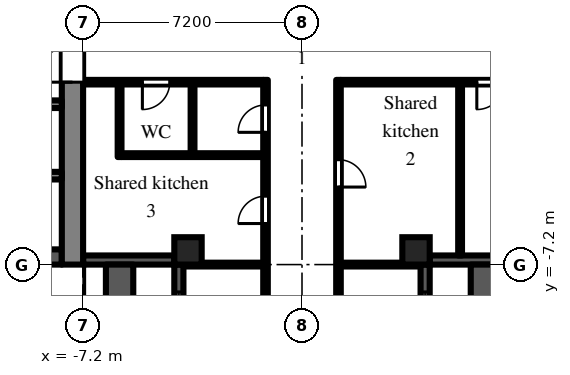
"""IFC4 building model, lengths in metres.
Left out: names, types, materials, properties, quantities, classifications, styles, units other than length and angle.
Written with IfcOpenShell. Run it as: python <this file> out.ifc"""

import sys

from ifc_helpers import new_model, si_unit, direction, frame, frame_2d, origin, origin_2d, place, context, subcontext, project, spatial, rectangle, extrude, element, fill, save


model = new_model("IFC4")
c1 = context("Model", 3, precision=1e-05, world=origin(), true_north=direction((0.0, 1.0)))
c2 = subcontext(c1, "Body", "Model", "MODEL_VIEW")
j1 = project(units=[si_unit("LENGTHUNIT", "METRE"), si_unit("PLANEANGLEUNIT", "RADIAN")], contexts=[c1])
p1 = place(None, origin())
s1 = spatial("IfcSite", under=j1, at=p1, CompositionType="ELEMENT")
p2 = place(p1, origin())
s2 = spatial("IfcBuilding", under=s1, at=p2, CompositionType="ELEMENT")
p3 = place(p2, frame((0.0, 0.0, 29.7)))
s3 = spatial("IfcBuildingStorey", under=s2, at=p3, CompositionType="ELEMENT", Elevation=29.7)
for number, where, z_axis, x_axis in (
    (1, (-3.75, -6.75, 0.0), (0.0, 0.0, 1.0), (1.0, 0.0, 0.0)),
    (2, (3.75, -6.75, 0.0), (0.0, 0.0, 1.0), (1.0, 0.0, 0.0)),
):
    element("IfcColumn", number, at=place(p3, frame(where, z_axis=z_axis, x_axis=x_axis)), inside=s3, PredefinedType="COLUMN", context=c2, shape_type="SweptSolid", body=[
        extrude(rectangle(XDim=0.9, YDim=0.9, at=origin_2d()), origin(), (0.0, 0.0, 1.0), 3.0),
    ])
p4 = place(p3, frame((-7.2, -7.05, 0.0), z_axis=(0.0, 0.0, 1.0), x_axis=(1.0, 0.0, 0.0)))
e3 = element("IfcWall", 3, at=p4, inside=s3, PredefinedType="SOLIDWALL", context=c2, shape_type="SweptSolid", body=[
    extrude(rectangle(XDim=3.0, YDim=0.3, at=frame_2d((1.5, 0.0))), origin(), (0.0, 0.0, 1.0), 2.1),
])
p5 = place(p3, frame((-4.05, -7.2, 0.0), z_axis=(0.0, 0.0, 1.0), x_axis=(0.0, -1.0, 0.0)))
e4 = element("IfcWall", 4, at=p5, inside=s3, PredefinedType="SOLIDWALL", context=c2, shape_type="SweptSolid", body=[
    extrude(rectangle(XDim=7.2, YDim=0.3, at=frame_2d((3.6, 0.0))), origin(), (0.0, 0.0, 1.0), 2.1),
])
p6 = place(p5, frame((3.0, 0.0, 0.0)))
e5 = element("IfcOpeningElement", 5, at=p6, cuts=e4, PredefinedType="OPENING", context=c2, shape_type="SweptSolid", body=[
    extrude(rectangle(XDim=1.2, YDim=2.05, at=frame_2d((0.6, 1.025))), frame((0.0, 0.16, 0.0), z_axis=(0.0, -1.0, 0.0), x_axis=(1.0, 0.0, 0.0)), (0.0, 0.0, 1.0), 0.32),
])
p7 = place(p5, frame((0.9, 0.0, 0.2)))
e6 = element("IfcOpeningElement", 6, at=p7, cuts=e4, PredefinedType="OPENING", context=c2, shape_type="SweptSolid", body=[
    extrude(rectangle(XDim=1.8, YDim=1.85, at=frame_2d((0.9, 0.925))), frame((0.0, 0.16, 0.0), z_axis=(0.0, -1.0, 0.0), x_axis=(1.0, 0.0, 0.0)), (0.0, 0.0, 1.0), 0.32),
])
p8 = place(p5, frame((4.5, 0.0, 0.2)))
e7 = element("IfcOpeningElement", 7, at=p8, cuts=e4, PredefinedType="OPENING", context=c2, shape_type="SweptSolid", body=[
    extrude(rectangle(XDim=1.8, YDim=1.85, at=frame_2d((0.9, 0.925))), frame((0.0, 0.16, 0.0), z_axis=(0.0, -1.0, 0.0), x_axis=(1.0, 0.0, 0.0)), (0.0, 0.0, 1.0), 0.32),
])
p9 = place(p3, frame((4.05, -14.4, 0.0), z_axis=(0.0, 0.0, 1.0), x_axis=(0.0, 1.0, 0.0)))
e8 = element("IfcWall", 8, at=p9, inside=s3, PredefinedType="SOLIDWALL", context=c2, shape_type="SweptSolid", body=[
    extrude(rectangle(XDim=7.2, YDim=0.3, at=frame_2d((3.6, 0.0))), origin(), (0.0, 0.0, 1.0), 2.1),
])
p10 = place(p9, frame((3.0, 0.0, 0.0)))
e9 = element("IfcOpeningElement", 9, at=p10, cuts=e8, PredefinedType="OPENING", context=c2, shape_type="SweptSolid", body=[
    extrude(rectangle(XDim=1.2, YDim=2.05, at=frame_2d((0.6, 1.025))), frame((0.0, 0.16, 0.0), z_axis=(0.0, -1.0, 0.0), x_axis=(1.0, 0.0, 0.0)), (0.0, 0.0, 1.0), 0.32),
])
p11 = place(p9, frame((0.9, 0.0, 0.2)))
e10 = element("IfcOpeningElement", 10, at=p11, cuts=e8, PredefinedType="OPENING", context=c2, shape_type="SweptSolid", body=[
    extrude(rectangle(XDim=1.8, YDim=1.85, at=frame_2d((0.9, 0.925))), frame((0.0, 0.16, 0.0), z_axis=(0.0, -1.0, 0.0), x_axis=(1.0, 0.0, 0.0)), (0.0, 0.0, 1.0), 0.32),
])
p12 = place(p9, frame((4.5, 0.0, 0.2)))
e11 = element("IfcOpeningElement", 11, at=p12, cuts=e8, PredefinedType="OPENING", context=c2, shape_type="SweptSolid", body=[
    extrude(rectangle(XDim=1.8, YDim=1.85, at=frame_2d((0.9, 0.925))), frame((0.0, 0.16, 0.0), z_axis=(0.0, -1.0, 0.0), x_axis=(1.0, 0.0, 0.0)), (0.0, 0.0, 1.0), 0.32),
])
p13 = place(p3, frame((4.2, -7.05, 0.0), z_axis=(0.0, 0.0, 1.0), x_axis=(1.0, 0.0, 0.0)))
e12 = element("IfcWall", 12, at=p13, inside=s3, PredefinedType="SOLIDWALL", context=c2, shape_type="SweptSolid", body=[
    extrude(rectangle(XDim=3.0, YDim=0.3, at=frame_2d((1.5, 0.0))), origin(), (0.0, 0.0, 1.0), 2.1),
])
for number, where, z_axis, x_axis in (
    (13, (6.0, -14.4, 0.0), (0.0, 0.0, 1.0), (0.0, 1.0, 0.0)),
    (14, (-6.0, -14.4, 0.0), (0.0, 0.0, 1.0), (0.0, 1.0, 0.0)),
):
    element("IfcWall", number, at=place(p3, frame(where, z_axis=z_axis, x_axis=x_axis)), inside=s3, PredefinedType="PARAPET", context=c2, shape_type="SweptSolid", body=[
        extrude(rectangle(XDim=7.2, YDim=0.9, at=frame_2d((3.6, 0.0))), origin(), (0.0, 0.0, 1.0), 0.8),
    ])
p14 = place(p3, frame((-7.55, -7.2, 0.0), z_axis=(0.0, 0.0, 1.0), x_axis=(0.0, 1.0, 0.0)))
e15 = element("IfcWall", 15, at=p14, inside=s3, PredefinedType="SHEAR", context=c2, shape_type="SweptSolid", body=[
    extrude(rectangle(XDim=14.4, YDim=0.7, at=frame_2d((7.2, 0.0))), origin(), (0.0, 0.0, 1.0), 2.575),
])
p15 = place(p14, frame((6.0, 0.0, 0.0)))
e16 = element("IfcOpeningElement", 16, at=p15, cuts=e15, PredefinedType="OPENING", context=c2, shape_type="SweptSolid", body=[
    extrude(rectangle(XDim=2.4, YDim=2.2, at=frame_2d((1.2, 1.1))), frame((0.0, 0.36, 0.0), z_axis=(0.0, -1.0, 0.0), x_axis=(1.0, 0.0, 0.0)), (0.0, 0.0, 1.0), 0.72),
])
p16 = place(p3, frame((-7.9, -6.95, 0.0), z_axis=(0.0, 0.0, 1.0), x_axis=(-1.0, 0.0, 0.0)))
e17 = element("IfcWall", 17, at=p16, inside=s3, PredefinedType="SHEAR", context=c2, shape_type="SweptSolid", body=[
    extrude(rectangle(XDim=12.95, YDim=0.5, at=frame_2d((6.475, 0.0))), origin(), (0.0, 0.0, 1.0), 2.575),
])
p17 = place(p3, frame((-7.9, -1.925, 0.0), z_axis=(0.0, 0.0, 1.0), x_axis=(-1.0, 0.0, 0.0)))
e18 = element("IfcWall", 18, at=p17, inside=s3, PredefinedType="SHEAR", context=c2, shape_type="SweptSolid", body=[
    extrude(rectangle(XDim=12.95, YDim=0.25, at=frame_2d((6.475, 0.0))), origin(), (0.0, 0.0, 1.0), 2.575),
])
p18 = place(p17, frame((4.825, 0.0, 0.0)))
e19 = element("IfcOpeningElement", 19, at=p18, cuts=e18, PredefinedType="OPENING", context=c2, shape_type="SweptSolid", body=[
    extrude(rectangle(XDim=1.1, YDim=2.1, at=frame_2d((0.55, 1.05))), frame((0.0, 0.135, 0.0), z_axis=(0.0, -1.0, 0.0), x_axis=(1.0, 0.0, 0.0)), (0.0, 0.0, 1.0), 0.27),
])
p19 = place(p17, frame((7.025, 0.0, 0.0)))
e20 = element("IfcOpeningElement", 20, at=p19, cuts=e18, PredefinedType="OPENING", context=c2, shape_type="SweptSolid", body=[
    extrude(rectangle(XDim=1.1, YDim=2.1, at=frame_2d((0.55, 1.05))), frame((0.0, 0.135, 0.0), z_axis=(0.0, -1.0, 0.0), x_axis=(1.0, 0.0, 0.0)), (0.0, 0.0, 1.0), 0.27),
])
p20 = place(p17, frame((9.225, 0.0, 0.0)))
e21 = element("IfcOpeningElement", 21, at=p20, cuts=e18, PredefinedType="OPENING", context=c2, shape_type="SweptSolid", body=[
    extrude(rectangle(XDim=1.1, YDim=2.1, at=frame_2d((0.55, 1.05))), frame((0.0, 0.135, 0.0), z_axis=(0.0, -1.0, 0.0), x_axis=(1.0, 0.0, 0.0)), (0.0, 0.0, 1.0), 0.27),
])
p21 = place(p17, frame((0.525, 0.0, 0.0)))
e22 = element("IfcOpeningElement", 22, at=p21, cuts=e18, PredefinedType="OPENING", context=c2, shape_type="SweptSolid", body=[
    extrude(rectangle(XDim=0.9, YDim=2.1, at=frame_2d((0.45, 1.05))), frame((0.0, 0.135, 0.0), z_axis=(0.0, -1.0, 0.0), x_axis=(1.0, 0.0, 0.0)), (0.0, 0.0, 1.0), 0.27),
])
p22 = place(p17, frame((2.625, 0.0, 0.0)))
e23 = element("IfcOpeningElement", 23, at=p22, cuts=e18, PredefinedType="OPENING", context=c2, shape_type="SweptSolid", body=[
    extrude(rectangle(XDim=1.1, YDim=2.1, at=frame_2d((0.55, 1.05))), frame((0.0, 0.135, 0.0), z_axis=(0.0, -1.0, 0.0), x_axis=(1.0, 0.0, 0.0)), (0.0, 0.0, 1.0), 0.27),
])
p23 = place(p3, frame((-7.9, -4.275, 0.0), z_axis=(0.0, 0.0, 1.0), x_axis=(-1.0, 0.0, 0.0)))
e24 = element("IfcWall", 24, at=p23, inside=s3, PredefinedType="SHEAR", context=c2, shape_type="SweptSolid", body=[
    extrude(rectangle(XDim=1.95, YDim=0.25, at=frame_2d((0.975, 0.0))), origin(), (0.0, 0.0, 1.0), 2.575),
])
p24 = place(p3, frame((-7.2, -1.2, 0.0), z_axis=(0.0, 0.0, 1.0), x_axis=(1.0, 0.0, 0.0)))
e25 = element("IfcWall", 25, at=p24, inside=s3, PredefinedType="PARTITIONING", context=c2, shape_type="SweptSolid", body=[
    extrude(rectangle(XDim=5.925, YDim=0.15, at=frame_2d((2.962, 0.0))), origin(), (0.0, 0.0, 1.0), 2.575),
])
p25 = place(p24, frame((1.95, 0.0, 0.0)))
e26 = element("IfcOpeningElement", 26, at=p25, cuts=e25, PredefinedType="OPENING", context=c2, shape_type="SweptSolid", body=[
    extrude(rectangle(XDim=0.9, YDim=2.1, at=frame_2d((0.45, 1.05))), frame((0.0, 0.085, 0.0), z_axis=(0.0, -1.0, 0.0), x_axis=(1.0, 0.0, 0.0)), (0.0, 0.0, 1.0), 0.17),
])
p26 = place(p3, frame((-6.0, -3.663, 0.0), z_axis=(0.0, 0.0, 1.0), x_axis=(0.0, 1.0, 0.0)))
e27 = element("IfcWall", 27, at=p26, inside=s3, PredefinedType="PARTITIONING", context=c2, shape_type="SweptSolid", body=[
    extrude(rectangle(XDim=2.388, YDim=0.125, at=frame_2d((1.194, 0.0))), origin(), (0.0, 0.0, 1.0), 2.575),
])
p27 = place(p3, frame((-5.938, -3.6, 0.0), z_axis=(0.0, 0.0, 1.0), x_axis=(1.0, 0.0, 0.0)))
e28 = element("IfcWall", 28, at=p27, inside=s3, PredefinedType="PARTITIONING", context=c2, shape_type="SweptSolid", body=[
    extrude(rectangle(XDim=4.663, YDim=0.125, at=frame_2d((2.331, 0.0))), origin(), (0.0, 0.0, 1.0), 2.575),
])
p28 = place(p3, frame((-3.9, -7.2, 0.0), z_axis=(0.0, 0.0, 1.0), x_axis=(1.0, 0.0, 0.0)))
e29 = element("IfcWall", 29, at=p28, inside=s3, PredefinedType="PARTITIONING", context=c2, shape_type="SweptSolid", body=[
    extrude(rectangle(XDim=2.625, YDim=0.125, at=frame_2d((1.312, 0.0))), origin(), (0.0, 0.0, 1.0), 2.575),
])
p29 = place(p3, frame((-3.6, -3.538, 0.0), z_axis=(0.0, 0.0, 1.0), x_axis=(0.0, 1.0, 0.0)))
e30 = element("IfcWall", 30, at=p29, inside=s3, PredefinedType="PARTITIONING", context=c2, shape_type="SweptSolid", body=[
    extrude(rectangle(XDim=2.263, YDim=0.125, at=frame_2d((1.131, 0.0))), origin(), (0.0, 0.0, 1.0), 2.575),
])
p30 = place(p3, frame((-1.2, -36.5, 0.0), z_axis=(0.0, 0.0, 1.0), x_axis=(0.0, 1.0, 0.0)))
e31 = element("IfcWall", 31, at=p30, inside=s3, PredefinedType="PARTITIONING", context=c2, shape_type="SweptSolid", body=[
    extrude(rectangle(XDim=35.375, YDim=0.15, at=frame_2d((17.688, 0.0))), origin(), (0.0, 0.0, 1.0), 2.575),
])
p31 = place(p30, frame((33.65, 0.0, 0.0)))
e32 = element("IfcOpeningElement", 32, at=p31, cuts=e31, PredefinedType="OPENING", context=c2, shape_type="SweptSolid", body=[
    extrude(rectangle(XDim=0.9, YDim=2.1, at=frame_2d((0.45, 1.05))), frame((0.0, 0.085, 0.0), z_axis=(0.0, -1.0, 0.0), x_axis=(1.0, 0.0, 0.0)), (0.0, 0.0, 1.0), 0.17),
])
p32 = place(p30, frame((30.65, 0.0, 0.0)))
e33 = element("IfcOpeningElement", 33, at=p32, cuts=e31, PredefinedType="OPENING", context=c2, shape_type="SweptSolid", body=[
    extrude(rectangle(XDim=0.9, YDim=2.1, at=frame_2d((0.45, 1.05))), frame((0.0, 0.085, 0.0), z_axis=(0.0, -1.0, 0.0), x_axis=(1.0, 0.0, 0.0)), (0.0, 0.0, 1.0), 0.17),
])
p33 = place(p30, frame((27.05, 0.0, 0.0)))
e34 = element("IfcOpeningElement", 34, at=p33, cuts=e31, PredefinedType="OPENING", context=c2, shape_type="SweptSolid", body=[
    extrude(rectangle(XDim=0.9, YDim=2.1, at=frame_2d((0.45, 1.05))), frame((0.0, 0.085, 0.0), z_axis=(0.0, -1.0, 0.0), x_axis=(1.0, 0.0, 0.0)), (0.0, 0.0, 1.0), 0.17),
])
p34 = place(p30, frame((20.9, 0.0, 0.0)))
e35 = element("IfcOpeningElement", 35, at=p34, cuts=e31, PredefinedType="OPENING", context=c2, shape_type="SweptSolid", body=[
    extrude(rectangle(XDim=1.0, YDim=2.1, at=frame_2d((0.5, 1.05))), frame((0.0, 0.085, 0.0), z_axis=(0.0, -1.0, 0.0), x_axis=(1.0, 0.0, 0.0)), (0.0, 0.0, 1.0), 0.17),
])
p35 = place(p30, frame((1.55, 0.0, 0.0)))
e36 = element("IfcOpeningElement", 36, at=p35, cuts=e31, PredefinedType="OPENING", context=c2, shape_type="SweptSolid", body=[
    extrude(rectangle(XDim=1.0, YDim=2.1, at=frame_2d((0.5, 1.05))), frame((0.0, 0.085, 0.0), z_axis=(0.0, -1.0, 0.0), x_axis=(1.0, 0.0, 0.0)), (0.0, 0.0, 1.0), 0.17),
])
p36 = place(p3, frame((1.2, -36.5, 0.0), z_axis=(0.0, 0.0, 1.0), x_axis=(0.0, 1.0, 0.0)))
e37 = element("IfcWall", 37, at=p36, inside=s3, PredefinedType="PARTITIONING", context=c2, shape_type="SweptSolid", body=[
    extrude(rectangle(XDim=35.375, YDim=0.15, at=frame_2d((17.688, 0.0))), origin(), (0.0, 0.0, 1.0), 2.575),
])
p37 = place(p36, frame((31.85, 0.0, 0.0)))
e38 = element("IfcOpeningElement", 38, at=p37, cuts=e37, PredefinedType="OPENING", context=c2, shape_type="SweptSolid", body=[
    extrude(rectangle(XDim=0.9, YDim=2.1, at=frame_2d((0.45, 1.05))), frame((0.0, 0.085, 0.0), z_axis=(0.0, -1.0, 0.0), x_axis=(1.0, 0.0, 0.0)), (0.0, 0.0, 1.0), 0.17),
])
p38 = place(p36, frame((23.45, 0.0, 0.0)))
e39 = element("IfcOpeningElement", 39, at=p38, cuts=e37, PredefinedType="OPENING", context=c2, shape_type="SweptSolid", body=[
    extrude(rectangle(XDim=0.9, YDim=2.1, at=frame_2d((0.45, 1.05))), frame((0.0, 0.085, 0.0), z_axis=(0.0, -1.0, 0.0), x_axis=(1.0, 0.0, 0.0)), (0.0, 0.0, 1.0), 0.17),
])
p39 = place(p36, frame((20.5, 0.0, 0.0)))
e40 = element("IfcOpeningElement", 40, at=p39, cuts=e37, PredefinedType="OPENING", context=c2, shape_type="SweptSolid", body=[
    extrude(rectangle(XDim=1.0, YDim=2.1, at=frame_2d((0.5, 1.05))), frame((0.0, 0.085, 0.0), z_axis=(0.0, -1.0, 0.0), x_axis=(1.0, 0.0, 0.0)), (0.0, 0.0, 1.0), 0.17),
])
p40 = place(p36, frame((1.55, 0.0, 0.0)))
e41 = element("IfcOpeningElement", 41, at=p40, cuts=e37, PredefinedType="OPENING", context=c2, shape_type="SweptSolid", body=[
    extrude(rectangle(XDim=1.0, YDim=2.1, at=frame_2d((0.5, 1.05))), frame((0.0, 0.085, 0.0), z_axis=(0.0, -1.0, 0.0), x_axis=(1.0, 0.0, 0.0)), (0.0, 0.0, 1.0), 0.17),
])
p41 = place(p3, frame((1.275, -7.2, 0.0), z_axis=(0.0, 0.0, 1.0), x_axis=(1.0, 0.0, 0.0)))
e42 = element("IfcWall", 42, at=p41, inside=s3, PredefinedType="PARTITIONING", context=c2, shape_type="SweptSolid", body=[
    extrude(rectangle(XDim=2.625, YDim=0.125, at=frame_2d((1.312, 0.0))), origin(), (0.0, 0.0, 1.0), 2.575),
])
p42 = place(p3, frame((1.275, -1.2, 0.0), z_axis=(0.0, 0.0, 1.0), x_axis=(1.0, 0.0, 0.0)))
e43 = element("IfcWall", 43, at=p42, inside=s3, PredefinedType="PARTITIONING", context=c2, shape_type="SweptSolid", body=[
    extrude(rectangle(XDim=5.925, YDim=0.15, at=frame_2d((2.962, 0.0))), origin(), (0.0, 0.0, 1.0), 2.575),
])
p43 = place(p42, frame((4.475, 0.0, 0.0)))
e44 = element("IfcOpeningElement", 44, at=p43, cuts=e43, PredefinedType="OPENING", context=c2, shape_type="SweptSolid", body=[
    extrude(rectangle(XDim=0.9, YDim=2.1, at=frame_2d((0.45, 1.05))), frame((0.0, 0.085, 0.0), z_axis=(0.0, -1.0, 0.0), x_axis=(1.0, 0.0, 0.0)), (0.0, 0.0, 1.0), 0.17),
])
p44 = place(p3, frame((5.2, -6.9, 0.0), z_axis=(0.0, 0.0, 1.0), x_axis=(0.0, 1.0, 0.0)))
e45 = element("IfcWall", 45, at=p44, inside=s3, PredefinedType="PARTITIONING", context=c2, shape_type="SweptSolid", body=[
    extrude(rectangle(XDim=5.625, YDim=0.125, at=frame_2d((2.812, 0.0))), origin(), (0.0, 0.0, 1.0), 2.575),
])
p45 = place(p7, origin())
e46 = element("IfcWindow", 46, at=p45, inside=s3, PartitioningType="SINGLE_PANEL", PredefinedType="WINDOW", context=c2, shape_type="SweptSolid", body=[
    extrude(rectangle(XDim=1.8, YDim=1.85, at=frame_2d((0.9, 0.925))), frame((0.0, 0.03, 0.0), z_axis=(0.0, -1.0, 0.0), x_axis=(1.0, 0.0, 0.0)), (0.0, 0.0, 1.0), 0.06),
])
fill(e6, e46)
p46 = place(p12, origin())
e47 = element("IfcWindow", 47, at=p46, inside=s3, PartitioningType="SINGLE_PANEL", PredefinedType="WINDOW", context=c2, shape_type="SweptSolid", body=[
    extrude(rectangle(XDim=1.8, YDim=1.85, at=frame_2d((0.9, 0.925))), frame((0.0, 0.03, 0.0), z_axis=(0.0, -1.0, 0.0), x_axis=(1.0, 0.0, 0.0)), (0.0, 0.0, 1.0), 0.06),
])
fill(e11, e47)
p47 = place(p15, origin())
e48 = element("IfcDoor", 48, at=p47, inside=s3, OperationType="DOUBLE_DOOR_DOUBLE_SWING", PredefinedType="DOOR", context=c2, shape_type="SweptSolid", body=[
    extrude(rectangle(XDim=2.4, YDim=2.2, at=frame_2d((1.2, 1.1))), frame((0.0, 0.025, 0.0), z_axis=(0.0, -1.0, 0.0), x_axis=(1.0, 0.0, 0.0)), (0.0, 0.0, 1.0), 0.05),
])
fill(e16, e48)
p48 = place(p37, frame((0.9, 0.0, 0.0), z_axis=(0.0, 0.0, 1.0), x_axis=(-1.0, 0.0, 0.0)))
e49 = element("IfcDoor", 49, at=p48, inside=s3, OperationType="SINGLE_SWING_RIGHT", PredefinedType="DOOR", context=c2, shape_type="SweptSolid", body=[
    extrude(rectangle(XDim=0.9, YDim=2.1, at=frame_2d((0.45, 1.05))), frame((0.0, 0.025, 0.0), z_axis=(0.0, -1.0, 0.0), x_axis=(1.0, 0.0, 0.0)), (0.0, 0.0, 1.0), 0.05),
])
fill(e38, e49)
p49 = place(p43, frame((0.9, 0.0, 0.0), z_axis=(0.0, 0.0, 1.0), x_axis=(-1.0, 0.0, 0.0)))
e50 = element("IfcDoor", 50, at=p49, inside=s3, OperationType="SINGLE_SWING_RIGHT", PredefinedType="DOOR", context=c2, shape_type="SweptSolid", body=[
    extrude(rectangle(XDim=0.9, YDim=2.1, at=frame_2d((0.45, 1.05))), frame((0.0, 0.025, 0.0), z_axis=(0.0, -1.0, 0.0), x_axis=(1.0, 0.0, 0.0)), (0.0, 0.0, 1.0), 0.05),
])
fill(e44, e50)
p50 = place(p31, origin())
e51 = element("IfcDoor", 51, at=p50, inside=s3, OperationType="SINGLE_SWING_LEFT", PredefinedType="DOOR", context=c2, shape_type="SweptSolid", body=[
    extrude(rectangle(XDim=0.9, YDim=2.1, at=frame_2d((0.45, 1.05))), frame((0.0, 0.025, 0.0), z_axis=(0.0, -1.0, 0.0), x_axis=(1.0, 0.0, 0.0)), (0.0, 0.0, 1.0), 0.05),
])
fill(e32, e51)
p51 = place(p25, frame((0.9, 0.0, 0.0), z_axis=(0.0, 0.0, 1.0), x_axis=(-1.0, 0.0, 0.0)))
e52 = element("IfcDoor", 52, at=p51, inside=s3, OperationType="SINGLE_SWING_RIGHT", PredefinedType="DOOR", context=c2, shape_type="SweptSolid", body=[
    extrude(rectangle(XDim=0.9, YDim=2.1, at=frame_2d((0.45, 1.05))), frame((0.0, 0.025, 0.0), z_axis=(0.0, -1.0, 0.0), x_axis=(1.0, 0.0, 0.0)), (0.0, 0.0, 1.0), 0.05),
])
fill(e26, e52)
p52 = place(p32, origin())
e53 = element("IfcDoor", 53, at=p52, inside=s3, OperationType="SINGLE_SWING_LEFT", PredefinedType="DOOR", context=c2, shape_type="SweptSolid", body=[
    extrude(rectangle(XDim=0.9, YDim=2.1, at=frame_2d((0.45, 1.05))), frame((0.0, 0.025, 0.0), z_axis=(0.0, -1.0, 0.0), x_axis=(1.0, 0.0, 0.0)), (0.0, 0.0, 1.0), 0.05),
])
fill(e33, e53)
save(model, sys.argv[1])
